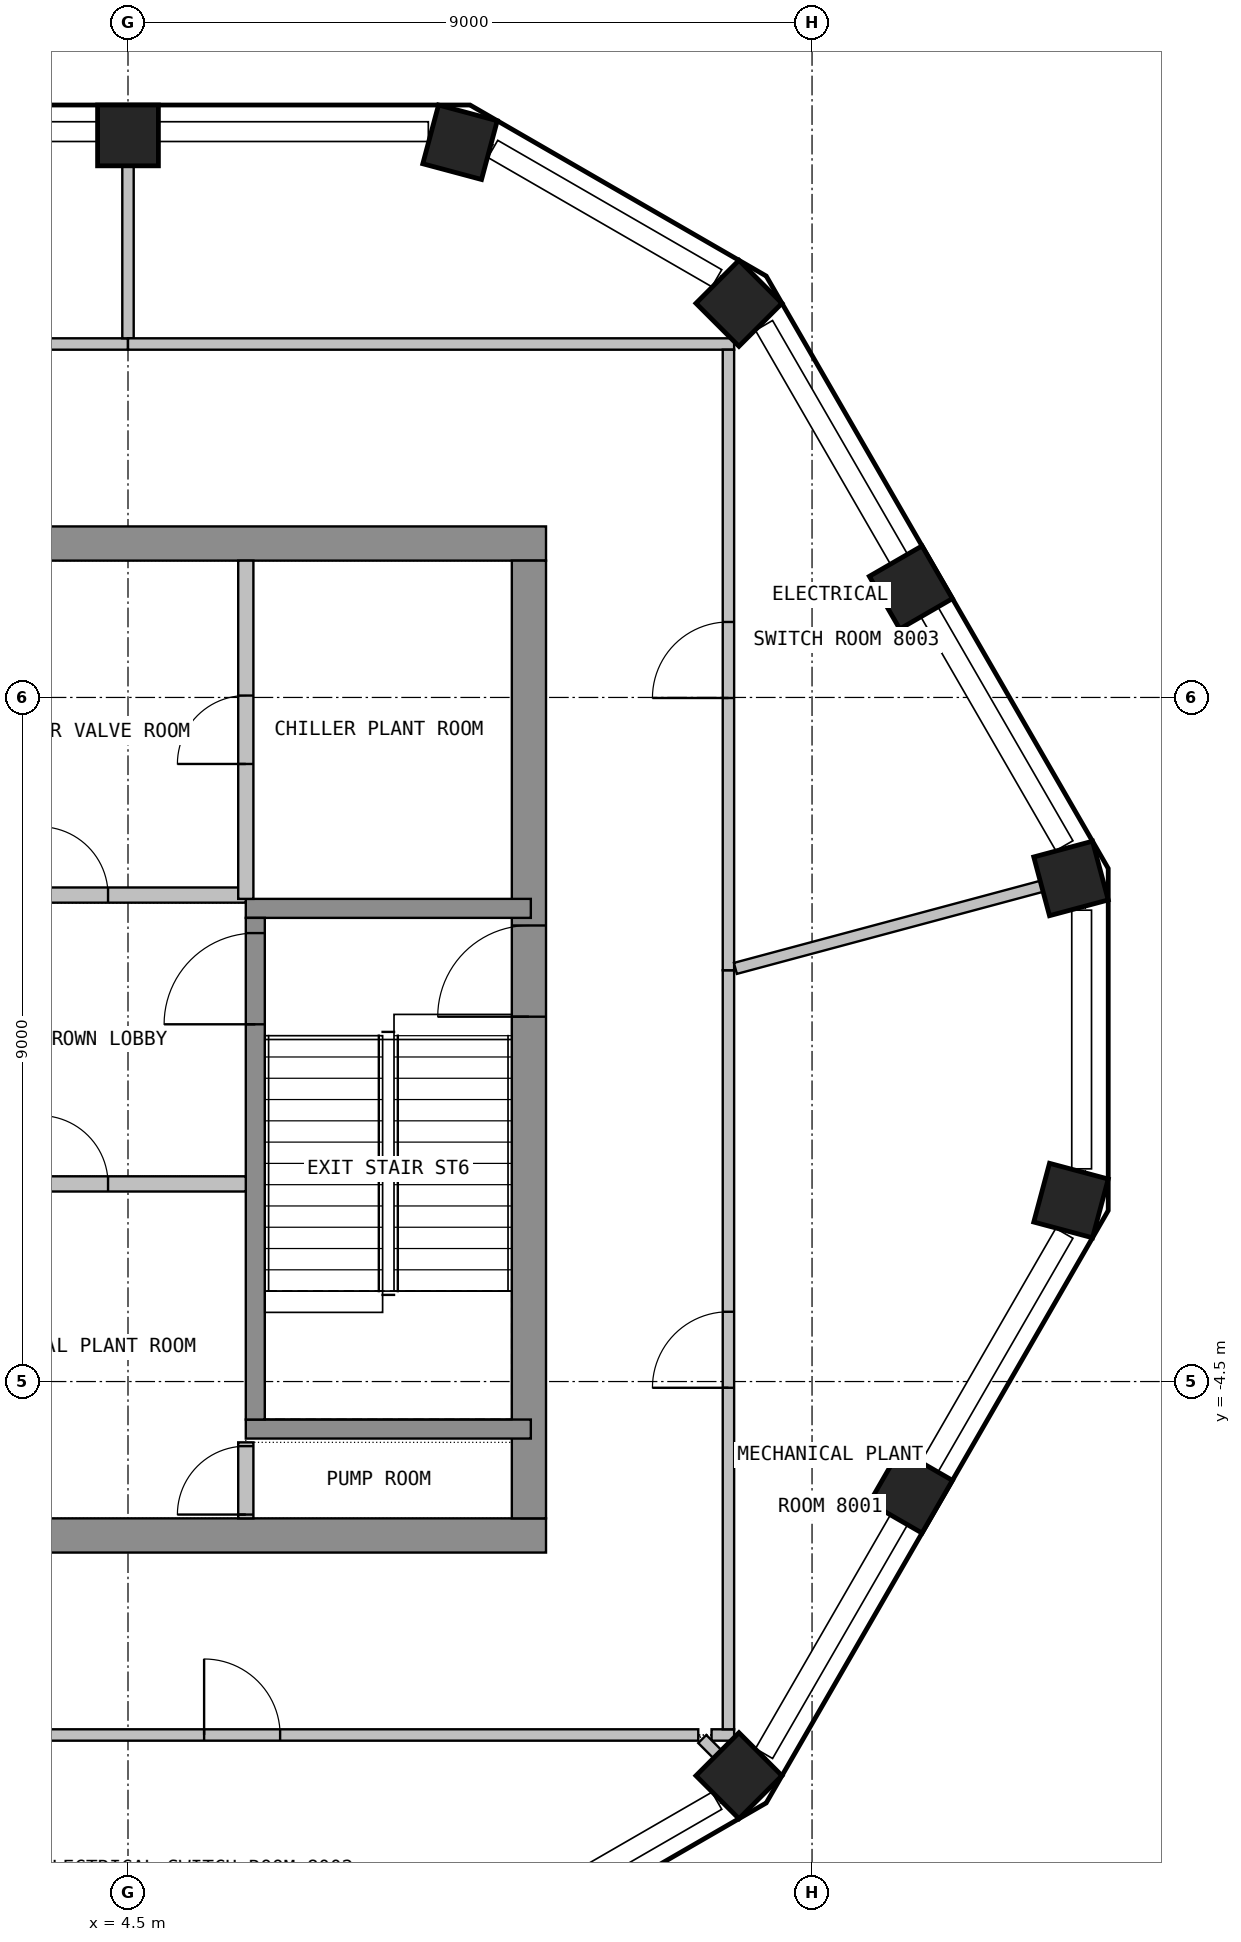
"""IFC4 building model, lengths in metres.
Left out: names, types, materials, properties, quantities, classifications, styles, units other than length and angle.
Written with IfcOpenShell. Run it as: python <this file> out.ifc"""

import sys

from ifc_helpers import new_model, si_unit, direction, frame, frame_2d, origin, origin_2d, place, context, subcontext, project, spatial, rectangle, extrude, element, fill, save


model = new_model("IFC4")
c1 = context("Model", 3, precision=1e-05, world=origin(), true_north=direction((0.0, 1.0)))
c2 = subcontext(c1, "Body", "Model", "MODEL_VIEW")
j1 = project(units=[si_unit("LENGTHUNIT", "METRE"), si_unit("PLANEANGLEUNIT", "RADIAN")], contexts=[c1])
p1 = place(None, origin())
s1 = spatial("IfcSite", under=j1, at=p1, CompositionType="ELEMENT")
p2 = place(p1, origin())
s2 = spatial("IfcBuilding", under=s1, at=p2, CompositionType="ELEMENT")
p3 = place(p2, frame((0.0, 0.0, 327.9)))
s3 = spatial("IfcBuildingStorey", under=s2, at=p3, CompositionType="ELEMENT", Elevation=327.9)
for number, where, z_axis, x_axis in (
    (1, (12.539, -9.686, 0.0), (0.0, 0.0, 1.0), (0.707, 0.707, 0.0)),
    (2, (14.801, -5.947, 0.0), (0.0, 0.0, 1.0), (0.5, 0.866, 0.0)),
    (3, (16.907, -2.119, 0.0), (0.0, 0.0, 1.0), (0.259, 0.966, 0.0)),
    (4, (16.907, 2.119, 0.0), (0.0, 0.0, 1.0), (-0.259, 0.966, 0.0)),
    (5, (14.801, 5.947, 0.0), (0.0, 0.0, 1.0), (-0.5, 0.866, 0.0)),
    (6, (12.539, 9.686, 0.0), (0.0, 0.0, 1.0), (-0.707, 0.707, 0.0)),
    (7, (8.869, 11.804, 0.0), (0.0, 0.0, 1.0), (-0.966, 0.259, 0.0)),
    (8, (4.5, 11.894, 0.0), (0.0, 0.0, 1.0), (-1.0, 0.0, 0.0)),
):
    element("IfcColumn", number, at=place(p3, frame(where, z_axis=z_axis, x_axis=x_axis)), inside=s3, PredefinedType="COLUMN", context=c2, shape_type="SweptSolid", body=[
        extrude(rectangle(XDim=0.8, YDim=0.8, at=origin_2d()), origin(), (0.0, 0.0, 1.0), 3.6),
    ])
for number, where, z_axis, x_axis in (
    (9, (-10.0, 6.525, 0.0), (0.0, 0.0, 1.0), (1.0, 0.0, 0.0)),
    (10, (-10.0, -6.525, 0.0), (0.0, 0.0, 1.0), (1.0, 0.0, 0.0)),
):
    element("IfcWall", number, at=place(p3, frame(where, z_axis=z_axis, x_axis=x_axis)), inside=s3, PredefinedType="SHEAR", context=c2, shape_type="SweptSolid", body=[
        extrude(rectangle(XDim=20.0, YDim=0.45, at=frame_2d((10.0, 0.0))), origin(), (0.0, 0.0, 1.0), 3.6),
    ])
p4 = place(p3, frame((9.775, -6.3, 0.0), z_axis=(0.0, 0.0, 1.0), x_axis=(0.0, 1.0, 0.0)))
e11 = element("IfcWall", 11, at=p4, inside=s3, PredefinedType="SHEAR", context=c2, shape_type="SweptSolid", body=[
    extrude(rectangle(XDim=12.6, YDim=0.45, at=frame_2d((6.3, 0.0))), origin(), (0.0, 0.0, 1.0), 3.6),
])
p5 = place(p4, frame((6.6, 0.0, 0.0)))
e12 = element("IfcOpeningElement", 12, at=p5, cuts=e11, PredefinedType="OPENING", context=c2, shape_type="SweptSolid", body=[
    extrude(rectangle(XDim=1.2, YDim=2.1, at=frame_2d((0.6, 1.05))), frame((0.0, 0.235, 0.0), z_axis=(0.0, -1.0, 0.0), x_axis=(1.0, 0.0, 0.0)), (0.0, 0.0, 1.0), 0.47),
])
for number, where, z_axis, x_axis in (
    (13, (6.05, -5.125, 0.0), (0.0, 0.0, 1.0), (1.0, 0.0, 0.0)),
    (14, (6.05, 1.725, 0.0), (0.0, 0.0, 1.0), (1.0, 0.0, 0.0)),
):
    element("IfcWall", number, at=place(p3, frame(where, z_axis=z_axis, x_axis=x_axis)), inside=s3, PredefinedType="SHEAR", context=c2, shape_type="SweptSolid", body=[
        extrude(rectangle(XDim=3.75, YDim=0.25, at=frame_2d((1.875, 0.0))), origin(), (0.0, 0.0, 1.0), 3.6),
    ])
p6 = place(p3, frame((6.175, -5.0, 0.0), z_axis=(0.0, 0.0, 1.0), x_axis=(0.0, 1.0, 0.0)))
e15 = element("IfcWall", 15, at=p6, inside=s3, PredefinedType="SHEAR", context=c2, shape_type="SweptSolid", body=[
    extrude(rectangle(XDim=6.6, YDim=0.25, at=frame_2d((3.3, 0.0))), origin(), (0.0, 0.0, 1.0), 3.6),
])
p7 = place(p6, frame((5.2, 0.0, 0.0)))
e16 = element("IfcOpeningElement", 16, at=p7, cuts=e15, PredefinedType="OPENING", context=c2, shape_type="SweptSolid", body=[
    extrude(rectangle(XDim=1.2, YDim=2.1, at=frame_2d((0.6, 1.05))), frame((0.0, 0.135, 0.0), z_axis=(0.0, -1.0, 0.0), x_axis=(1.0, 0.0, 0.0)), (0.0, 0.0, 1.0), 0.27),
])
p8 = place(p3, frame((1.525, 1.9, 0.0), z_axis=(0.0, 0.0, 1.0), x_axis=(1.0, 0.0, 0.0)))
e17 = element("IfcWall", 17, at=p8, inside=s3, PredefinedType="PARTITIONING", context=c2, shape_type="SweptSolid", body=[
    extrude(rectangle(XDim=4.525, YDim=0.2, at=frame_2d((2.263, 0.0))), origin(), (0.0, 0.0, 1.0), 3.6),
])
p9 = place(p8, frame((1.812, 0.0, 0.0)))
e18 = element("IfcOpeningElement", 18, at=p9, cuts=e17, PredefinedType="OPENING", context=c2, shape_type="SweptSolid", body=[
    extrude(rectangle(XDim=0.9, YDim=2.1, at=frame_2d((0.45, 1.05))), frame((0.0, 0.11, 0.0), z_axis=(0.0, -1.0, 0.0), x_axis=(1.0, 0.0, 0.0)), (0.0, 0.0, 1.0), 0.22),
])
p10 = place(p3, frame((1.525, -1.9, 0.0), z_axis=(0.0, 0.0, 1.0), x_axis=(1.0, 0.0, 0.0)))
e19 = element("IfcWall", 19, at=p10, inside=s3, PredefinedType="PARTITIONING", context=c2, shape_type="SweptSolid", body=[
    extrude(rectangle(XDim=4.525, YDim=0.2, at=frame_2d((2.263, 0.0))), origin(), (0.0, 0.0, 1.0), 3.6),
])
p11 = place(p10, frame((1.812, 0.0, 0.0)))
e20 = element("IfcOpeningElement", 20, at=p11, cuts=e19, PredefinedType="OPENING", context=c2, shape_type="SweptSolid", body=[
    extrude(rectangle(XDim=0.9, YDim=2.1, at=frame_2d((0.45, 1.05))), frame((0.0, 0.11, 0.0), z_axis=(0.0, -1.0, 0.0), x_axis=(1.0, 0.0, 0.0)), (0.0, 0.0, 1.0), 0.22),
])
p12 = place(p3, frame((6.05, 1.85, 0.0), z_axis=(0.0, 0.0, 1.0), x_axis=(0.0, 1.0, 0.0)))
e21 = element("IfcWall", 21, at=p12, inside=s3, PredefinedType="PARTITIONING", context=c2, shape_type="SweptSolid", body=[
    extrude(rectangle(XDim=4.45, YDim=0.2, at=frame_2d((2.225, 0.0))), origin(), (0.0, 0.0, 1.0), 3.6),
])
p13 = place(p12, frame((1.775, 0.0, 0.0)))
e22 = element("IfcOpeningElement", 22, at=p13, cuts=e21, PredefinedType="OPENING", context=c2, shape_type="SweptSolid", body=[
    extrude(rectangle(XDim=0.9, YDim=2.1, at=frame_2d((0.45, 1.05))), frame((0.0, 0.11, 0.0), z_axis=(0.0, -1.0, 0.0), x_axis=(1.0, 0.0, 0.0)), (0.0, 0.0, 1.0), 0.22),
])
p14 = place(p3, frame((6.05, -6.3, 0.0), z_axis=(0.0, 0.0, 1.0), x_axis=(0.0, 1.0, 0.0)))
e23 = element("IfcWall", 23, at=p14, inside=s3, PredefinedType="PARTITIONING", context=c2, shape_type="SweptSolid", body=[
    extrude(rectangle(XDim=1.0, YDim=0.2, at=frame_2d((0.5, 0.0))), origin(), (0.0, 0.0, 1.0), 3.6),
])
p15 = place(p14, frame((0.05, 0.0, 0.0)))
e24 = element("IfcOpeningElement", 24, at=p15, cuts=e23, PredefinedType="OPENING", context=c2, shape_type="SweptSolid", body=[
    extrude(rectangle(XDim=0.9, YDim=2.1, at=frame_2d((0.45, 1.05))), frame((0.0, 0.11, 0.0), z_axis=(0.0, -1.0, 0.0), x_axis=(1.0, 0.0, 0.0)), (0.0, 0.0, 1.0), 0.22),
])
p16 = place(p3, frame((4.5, 9.15, 0.0), z_axis=(0.0, 0.0, 1.0), x_axis=(-1.0, 0.0, 0.0)))
e25 = element("IfcWall", 25, at=p16, inside=s3, PredefinedType="PARTITIONING", context=c2, shape_type="SweptSolid", body=[
    extrude(rectangle(XDim=12.658, YDim=0.15, at=frame_2d((6.329, 0.0))), origin(), (0.0, 0.0, 1.0), 3.6),
])
p17 = place(p16, frame((5.829, 0.0, 0.0)))
e26 = element("IfcOpeningElement", 26, at=p17, cuts=e25, PredefinedType="OPENING", context=c2, shape_type="SweptSolid", body=[
    extrude(rectangle(XDim=1.0, YDim=2.1, at=frame_2d((0.5, 1.05))), frame((0.0, 0.085, 0.0), z_axis=(0.0, -1.0, 0.0), x_axis=(1.0, 0.0, 0.0)), (0.0, 0.0, 1.0), 0.17),
])
p18 = place(p3, frame((0.0, -9.15, 0.0), z_axis=(0.0, 0.0, 1.0), x_axis=(1.0, 0.0, 0.0)))
e27 = element("IfcWall", 27, at=p18, inside=s3, PredefinedType="PARTITIONING", context=c2, shape_type="SweptSolid", body=[
    extrude(rectangle(XDim=12.003, YDim=0.15, at=frame_2d((6.001, 0.0))), origin(), (0.0, 0.0, 1.0), 3.6),
])
p19 = place(p18, frame((5.501, 0.0, 0.0)))
e28 = element("IfcOpeningElement", 28, at=p19, cuts=e27, PredefinedType="OPENING", context=c2, shape_type="SweptSolid", body=[
    extrude(rectangle(XDim=1.0, YDim=2.1, at=frame_2d((0.5, 1.05))), frame((0.0, 0.085, 0.0), z_axis=(0.0, -1.0, 0.0), x_axis=(1.0, 0.0, 0.0)), (0.0, 0.0, 1.0), 0.17),
])
p20 = place(p3, frame((4.5, 11.994, 0.0), z_axis=(0.0, 0.0, 1.0), x_axis=(0.0, -1.0, 0.0)))
e29 = element("IfcWall", 29, at=p20, inside=s3, PredefinedType="PARTITIONING", context=c2, shape_type="SweptSolid", body=[
    extrude(rectangle(XDim=2.769, YDim=0.15, at=frame_2d((1.384, 0.0))), origin(), (0.0, 0.0, 1.0), 3.6),
])
p21 = place(p3, frame((12.475, 9.15, 0.0), z_axis=(0.0, 0.0, 1.0), x_axis=(-1.0, 0.0, 0.0)))
e30 = element("IfcWall", 30, at=p21, inside=s3, PredefinedType="PARTITIONING", context=c2, shape_type="SweptSolid", body=[
    extrude(rectangle(XDim=7.975, YDim=0.15, at=frame_2d((3.988, 0.0))), origin(), (0.0, 0.0, 1.0), 3.6),
])
p22 = place(p3, frame((12.178, -9.15, 0.0), z_axis=(0.0, 0.0, 1.0), x_axis=(1.0, 0.0, 0.0)))
e31 = element("IfcWall", 31, at=p22, inside=s3, PredefinedType="PARTITIONING", context=c2, shape_type="SweptSolid", body=[
    extrude(rectangle(XDim=0.297, YDim=0.15, at=frame_2d((0.148, 0.0))), origin(), (0.0, 0.0, 1.0), 3.6),
])
p23 = place(p3, frame((12.056, -9.203, 0.0), z_axis=(0.0, 0.0, 1.0), x_axis=(0.706689978005, -0.707523338828, 0.0)))
e32 = element("IfcWall", 32, at=p23, inside=s3, PredefinedType="PARTITIONING", context=c2, shape_type="SweptSolid", body=[
    extrude(rectangle(XDim=0.879, YDim=0.15, at=frame_2d((0.439, 0.0))), origin(), (0.0, 0.0, 1.0), 3.6),
])
p24 = place(p3, frame((12.4, -9.075, 0.0), z_axis=(0.0, 0.0, 1.0), x_axis=(0.0, 1.0, 0.0)))
e33 = element("IfcWall", 33, at=p24, inside=s3, PredefinedType="PARTITIONING", context=c2, shape_type="SweptSolid", body=[
    extrude(rectangle(XDim=9.986, YDim=0.15, at=frame_2d((4.993, 0.0))), origin(), (0.0, 0.0, 1.0), 3.6),
])
p25 = place(p24, frame((4.493, 0.0, 0.0)))
e34 = element("IfcOpeningElement", 34, at=p25, cuts=e33, PredefinedType="OPENING", context=c2, shape_type="SweptSolid", body=[
    extrude(rectangle(XDim=1.0, YDim=2.1, at=frame_2d((0.5, 1.05))), frame((0.0, 0.085, 0.0), z_axis=(0.0, -1.0, 0.0), x_axis=(1.0, 0.0, 0.0)), (0.0, 0.0, 1.0), 0.17),
])
p26 = place(p3, frame((12.4, 0.911, 0.0), z_axis=(0.0, 0.0, 1.0), x_axis=(0.0, 1.0, 0.0)))
e35 = element("IfcWall", 35, at=p26, inside=s3, PredefinedType="PARTITIONING", context=c2, shape_type="SweptSolid", body=[
    extrude(rectangle(XDim=8.164, YDim=0.15, at=frame_2d((4.082, 0.0))), origin(), (0.0, 0.0, 1.0), 3.6),
])
p27 = place(p26, frame((3.582, 0.0, 0.0)))
e36 = element("IfcOpeningElement", 36, at=p27, cuts=e35, PredefinedType="OPENING", context=c2, shape_type="SweptSolid", body=[
    extrude(rectangle(XDim=1.0, YDim=2.1, at=frame_2d((0.5, 1.05))), frame((0.0, 0.085, 0.0), z_axis=(0.0, -1.0, 0.0), x_axis=(1.0, 0.0, 0.0)), (0.0, 0.0, 1.0), 0.17),
])
p28 = place(p3, frame((17.097, 2.17, 0.0), z_axis=(0.0, 0.0, 1.0), x_axis=(-0.965904388236, -0.258899039756, 0.0)))
e37 = element("IfcWall", 37, at=p28, inside=s3, PredefinedType="PARTITIONING", context=c2, shape_type="SweptSolid", body=[
    extrude(rectangle(XDim=4.768, YDim=0.15, at=frame_2d((2.384, 0.0))), origin(), (0.0, 0.0, 1.0), 3.6),
])
p29 = place(p5, origin())
e38 = element("IfcDoor", 38, at=p29, inside=s3, OperationType="SINGLE_SWING_RIGHT", PredefinedType="DOOR", context=c2, shape_type="SweptSolid", body=[
    extrude(rectangle(XDim=1.2, YDim=2.1, at=frame_2d((0.6, 1.05))), frame((0.0, 0.025, 0.0), z_axis=(0.0, -1.0, 0.0), x_axis=(1.0, 0.0, 0.0)), (0.0, 0.0, 1.0), 0.05),
])
fill(e12, e38)
p30 = place(p7, origin())
e39 = element("IfcDoor", 39, at=p30, inside=s3, OperationType="SINGLE_SWING_LEFT", PredefinedType="DOOR", context=c2, shape_type="SweptSolid", body=[
    extrude(rectangle(XDim=1.2, YDim=2.1, at=frame_2d((0.6, 1.05))), frame((0.0, 0.025, 0.0), z_axis=(0.0, -1.0, 0.0), x_axis=(1.0, 0.0, 0.0)), (0.0, 0.0, 1.0), 0.05),
])
fill(e16, e39)
p31 = place(p9, origin())
e40 = element("IfcDoor", 40, at=p31, inside=s3, OperationType="SINGLE_SWING_LEFT", PredefinedType="DOOR", context=c2, shape_type="SweptSolid", body=[
    extrude(rectangle(XDim=0.9, YDim=2.1, at=frame_2d((0.45, 1.05))), frame((0.0, 0.025, 0.0), z_axis=(0.0, -1.0, 0.0), x_axis=(1.0, 0.0, 0.0)), (0.0, 0.0, 1.0), 0.05),
])
fill(e18, e40)
p32 = place(p11, origin())
e41 = element("IfcDoor", 41, at=p32, inside=s3, OperationType="SINGLE_SWING_LEFT", PredefinedType="DOOR", context=c2, shape_type="SweptSolid", body=[
    extrude(rectangle(XDim=0.9, YDim=2.1, at=frame_2d((0.45, 1.05))), frame((0.0, 0.025, 0.0), z_axis=(0.0, -1.0, 0.0), x_axis=(1.0, 0.0, 0.0)), (0.0, 0.0, 1.0), 0.05),
])
fill(e20, e41)
p33 = place(p13, origin())
e42 = element("IfcDoor", 42, at=p33, inside=s3, OperationType="SINGLE_SWING_LEFT", PredefinedType="DOOR", context=c2, shape_type="SweptSolid", body=[
    extrude(rectangle(XDim=0.9, YDim=2.1, at=frame_2d((0.45, 1.05))), frame((0.0, 0.025, 0.0), z_axis=(0.0, -1.0, 0.0), x_axis=(1.0, 0.0, 0.0)), (0.0, 0.0, 1.0), 0.05),
])
fill(e22, e42)
p34 = place(p15, origin())
e43 = element("IfcDoor", 43, at=p34, inside=s3, OperationType="SINGLE_SWING_LEFT", PredefinedType="DOOR", context=c2, shape_type="SweptSolid", body=[
    extrude(rectangle(XDim=0.9, YDim=2.1, at=frame_2d((0.45, 1.05))), frame((0.0, 0.025, 0.0), z_axis=(0.0, -1.0, 0.0), x_axis=(1.0, 0.0, 0.0)), (0.0, 0.0, 1.0), 0.05),
])
fill(e24, e43)
p35 = place(p19, origin())
e44 = element("IfcDoor", 44, at=p35, inside=s3, OperationType="SINGLE_SWING_RIGHT", PredefinedType="DOOR", context=c2, shape_type="SweptSolid", body=[
    extrude(rectangle(XDim=1.0, YDim=2.1, at=frame_2d((0.5, 1.05))), frame((0.0, 0.025, 0.0), z_axis=(0.0, -1.0, 0.0), x_axis=(1.0, 0.0, 0.0)), (0.0, 0.0, 1.0), 0.05),
])
fill(e28, e44)
p36 = place(p27, origin())
e45 = element("IfcDoor", 45, at=p36, inside=s3, OperationType="SINGLE_SWING_LEFT", PredefinedType="DOOR", context=c2, shape_type="SweptSolid", body=[
    extrude(rectangle(XDim=1.0, YDim=2.1, at=frame_2d((0.5, 1.05))), frame((0.0, 0.025, 0.0), z_axis=(0.0, -1.0, 0.0), x_axis=(1.0, 0.0, 0.0)), (0.0, 0.0, 1.0), 0.05),
])
fill(e36, e45)
p37 = place(p25, origin())
e46 = element("IfcDoor", 46, at=p37, inside=s3, OperationType="SINGLE_SWING_RIGHT", PredefinedType="DOOR", context=c2, shape_type="SweptSolid", body=[
    extrude(rectangle(XDim=1.0, YDim=2.1, at=frame_2d((0.5, 1.05))), frame((0.0, 0.025, 0.0), z_axis=(0.0, -1.0, 0.0), x_axis=(1.0, 0.0, 0.0)), (0.0, 0.0, 1.0), 0.05),
])
fill(e34, e46)
save(model, sys.argv[1])
